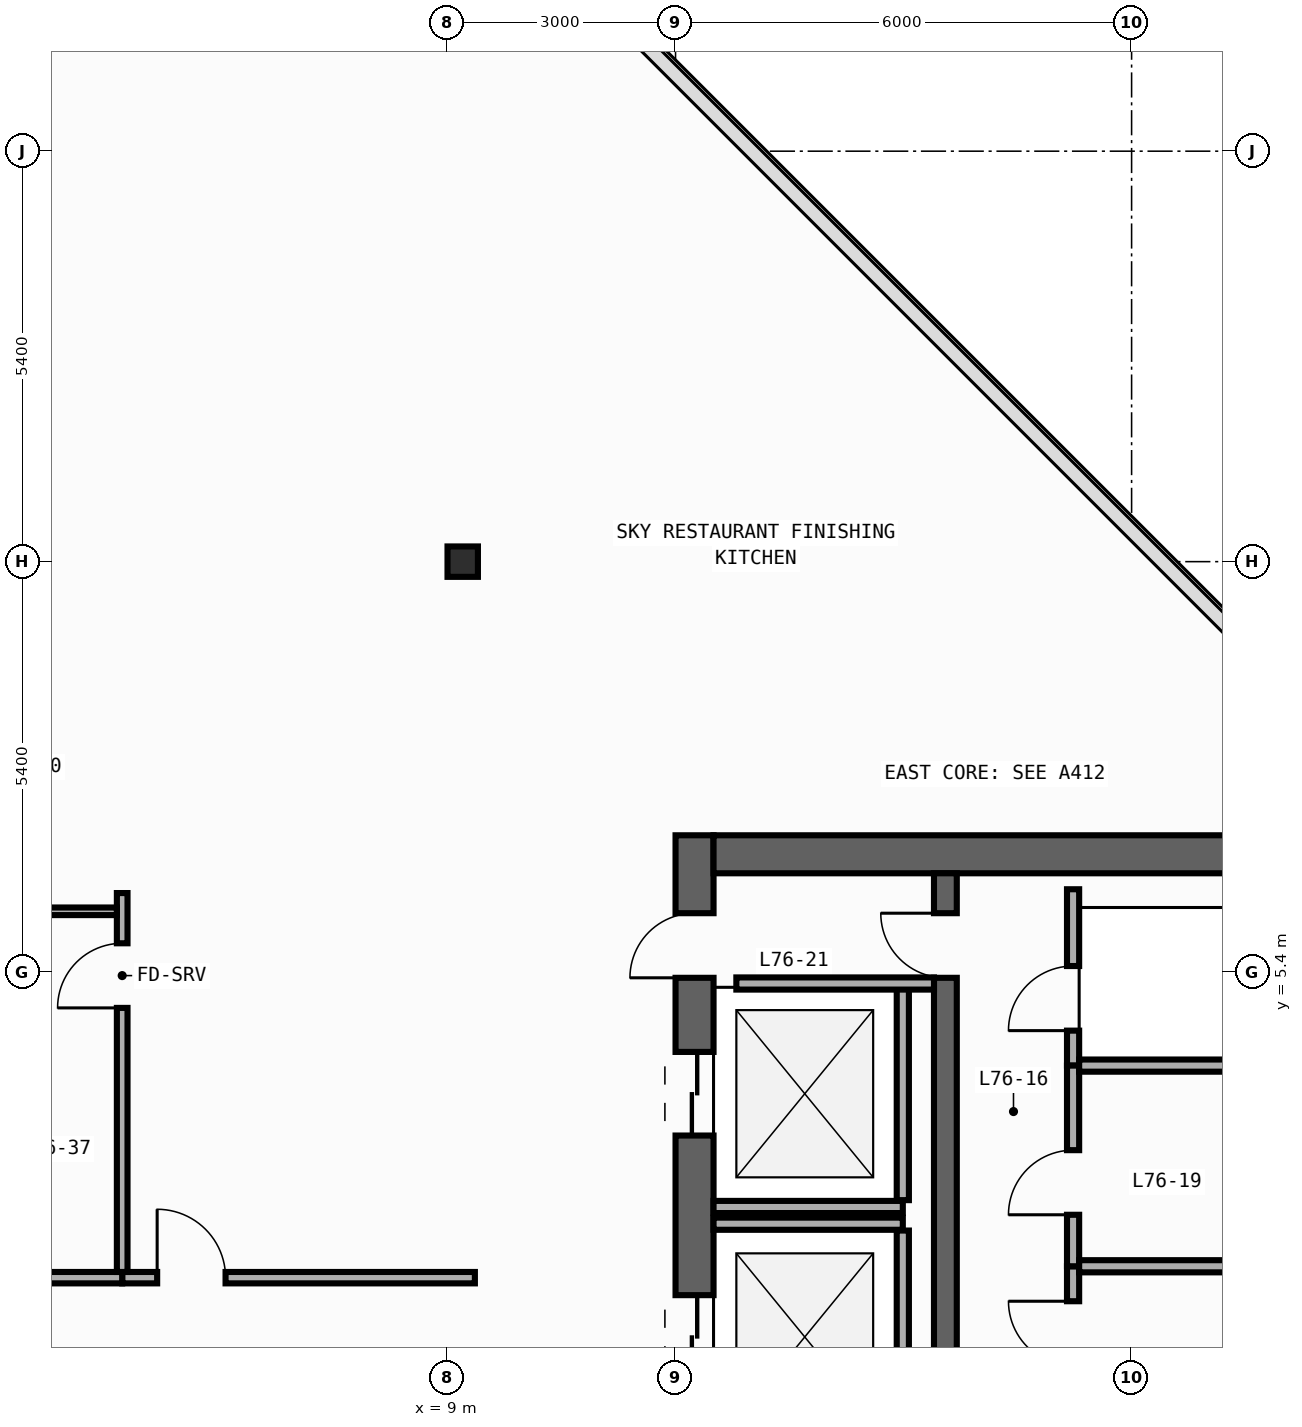
"""IFC4 building model, lengths in metres.
Left out: names, types, materials, properties, quantities, classifications, styles, units other than length and angle.
Written with IfcOpenShell. Run it as: python <this file> out.ifc"""

import sys

from ifc_helpers import new_model, si_unit, direction, frame, frame_2d, origin, origin_2d, place, context, subcontext, project, spatial, rectangle, i_section, extrude, element, fill, save


model = new_model("IFC4")
c1 = context("Model", 3, precision=1e-05, world=origin(), true_north=direction((0.0, 1.0)))
c2 = subcontext(c1, "Body", "Model", "MODEL_VIEW")
j1 = project(units=[si_unit("LENGTHUNIT", "METRE"), si_unit("PLANEANGLEUNIT", "RADIAN")], contexts=[c1])
p1 = place(None, origin())
s1 = spatial("IfcSite", under=j1, at=p1, CompositionType="ELEMENT")
p2 = place(p1, origin())
s2 = spatial("IfcBuilding", under=s1, at=p2, CompositionType="ELEMENT")
p3 = place(p2, frame((0.0, 0.0, 315.6)))
s3 = spatial("IfcBuildingStorey", under=s2, at=p3, CompositionType="ELEMENT", Elevation=315.6)
p4 = place(p3, frame((12.25, -19.8, 0.0), z_axis=(0.0, 0.0, 1.0), x_axis=(0.0, 1.0, 0.0)))
e1 = element("IfcWall", 1, at=p4, inside=s3, PredefinedType="SHEAR", context=c2, shape_type="SweptSolid", body=[
    extrude(rectangle(XDim=27.0, YDim=0.5, at=frame_2d((13.5, 0.0))), origin(), (0.0, 0.0, 1.0), 4.54),
])
p5 = place(p4, frame((23.05, 0.0, 0.0)))
e2 = element("IfcOpeningElement", 2, at=p5, cuts=e1, PredefinedType="OPENING", context=c2, shape_type="SweptSolid", body=[
    extrude(rectangle(XDim=1.1, YDim=2.2, at=frame_2d((0.55, 1.1))), frame((0.0, 0.26, 0.0), z_axis=(0.0, -1.0, 0.0), x_axis=(1.0, 0.0, 0.0)), (0.0, 0.0, 1.0), 0.52),
])
p6 = place(p4, frame((19.85, 0.0, 0.0)))
e3 = element("IfcOpeningElement", 3, at=p6, cuts=e1, PredefinedType="OPENING", context=c2, shape_type="SweptSolid", body=[
    extrude(rectangle(XDim=1.1, YDim=2.2, at=frame_2d((0.55, 1.1))), frame((0.0, 0.26, 0.0), z_axis=(0.0, -1.0, 0.0), x_axis=(1.0, 0.0, 0.0)), (0.0, 0.0, 1.0), 0.52),
])
p7 = place(p4, frame((16.65, 0.0, 0.0)))
e4 = element("IfcOpeningElement", 4, at=p7, cuts=e1, PredefinedType="OPENING", context=c2, shape_type="SweptSolid", body=[
    extrude(rectangle(XDim=1.1, YDim=2.2, at=frame_2d((0.55, 1.1))), frame((0.0, 0.26, 0.0), z_axis=(0.0, -1.0, 0.0), x_axis=(1.0, 0.0, 0.0)), (0.0, 0.0, 1.0), 0.52),
])
p8 = place(p4, frame((7.175, 0.0, 0.0)))
e5 = element("IfcOpeningElement", 5, at=p8, cuts=e1, PredefinedType="OPENING", context=c2, shape_type="SweptSolid", body=[
    extrude(rectangle(XDim=0.85, YDim=2.1, at=frame_2d((0.425, 1.05))), frame((0.0, 0.26, 0.0), z_axis=(0.0, -1.0, 0.0), x_axis=(1.0, 0.0, 0.0)), (0.0, 0.0, 1.0), 0.52),
])
p9 = place(p4, frame((10.375, 0.0, 0.0)))
e6 = element("IfcOpeningElement", 6, at=p9, cuts=e1, PredefinedType="OPENING", context=c2, shape_type="SweptSolid", body=[
    extrude(rectangle(XDim=0.85, YDim=2.1, at=frame_2d((0.425, 1.05))), frame((0.0, 0.26, 0.0), z_axis=(0.0, -1.0, 0.0), x_axis=(1.0, 0.0, 0.0)), (0.0, 0.0, 1.0), 0.52),
])
p10 = place(p4, frame((12.725, 0.0, 0.0)))
e7 = element("IfcOpeningElement", 7, at=p10, cuts=e1, PredefinedType="OPENING", context=c2, shape_type="SweptSolid", body=[
    extrude(rectangle(XDim=1.15, YDim=2.2, at=frame_2d((0.575, 1.1))), frame((0.0, 0.26, 0.0), z_axis=(0.0, -1.0, 0.0), x_axis=(1.0, 0.0, 0.0)), (0.0, 0.0, 1.0), 0.52),
])
p11 = place(p4, frame((25.125, 0.0, 0.0)))
e8 = element("IfcOpeningElement", 8, at=p11, cuts=e1, PredefinedType="OPENING", context=c2, shape_type="SweptSolid", body=[
    extrude(rectangle(XDim=0.85, YDim=2.1, at=frame_2d((0.425, 1.05))), frame((0.0, 0.26, 0.0), z_axis=(0.0, -1.0, 0.0), x_axis=(1.0, 0.0, 0.0)), (0.0, 0.0, 1.0), 0.52),
])
p12 = place(p3, frame((12.5, 6.95, 0.0), z_axis=(0.0, 0.0, 1.0), x_axis=(1.0, 0.0, 0.0)))
e9 = element("IfcWall", 9, at=p12, inside=s3, PredefinedType="SHEAR", context=c2, shape_type="SweptSolid", body=[
    extrude(rectangle(XDim=7.4, YDim=0.5, at=frame_2d((3.7, 0.0))), origin(), (0.0, 0.0, 1.0), 4.54),
])
p13 = place(p3, frame((15.55, -19.3, 0.0), z_axis=(0.0, 0.0, 1.0), x_axis=(0.0, 1.0, 0.0)))
e10 = element("IfcWall", 10, at=p13, inside=s3, PredefinedType="SHEAR", context=c2, shape_type="SweptSolid", body=[
    extrude(rectangle(XDim=26.0, YDim=0.3, at=frame_2d((13.0, 0.0))), origin(), (0.0, 0.0, 1.0), 4.54),
])
p14 = place(p13, frame((12.225, 0.0, 0.0)))
e11 = element("IfcOpeningElement", 11, at=p14, cuts=e10, PredefinedType="OPENING", context=c2, shape_type="SweptSolid", body=[
    extrude(rectangle(XDim=1.15, YDim=2.2, at=frame_2d((0.575, 1.1))), frame((0.0, 0.16, 0.0), z_axis=(0.0, -1.0, 0.0), x_axis=(1.0, 0.0, 0.0)), (0.0, 0.0, 1.0), 0.32),
])
p15 = place(p13, frame((24.625, 0.0, 0.0)))
e12 = element("IfcOpeningElement", 12, at=p15, cuts=e10, PredefinedType="OPENING", context=c2, shape_type="SweptSolid", body=[
    extrude(rectangle(XDim=0.85, YDim=2.1, at=frame_2d((0.425, 1.05))), frame((0.0, 0.16, 0.0), z_axis=(0.0, -1.0, 0.0), x_axis=(1.0, 0.0, 0.0)), (0.0, 0.0, 1.0), 0.32),
])
p16 = place(p3, frame((9.2, 10.8, 0.0), z_axis=(0.0, 0.0, 1.0), x_axis=(1.0, 0.0, 0.0)))
e13 = element("IfcColumn", 13, at=p16, inside=s3, PredefinedType="COLUMN", context=c2, shape_type="SweptSolid", body=[
    extrude(i_section(OverallWidth=0.4, OverallDepth=0.4, WebThickness=0.013, FlangeThickness=0.021, FilletRadius=0.022, at=origin_2d()), origin(), (0.0, 0.0, 1.0), 4.8),
])
p17 = place(p3, frame((12.5, 2.31, 0.0), z_axis=(0.0, 0.0, 1.0), x_axis=(1.0, 0.0, 0.0)))
e14 = element("IfcWall", 14, at=p17, inside=s3, PredefinedType="STANDARD", context=c2, shape_type="SweptSolid", body=[
    extrude(rectangle(XDim=2.49, YDim=0.16, at=frame_2d((1.245, 0.0))), origin(), (0.0, 0.0, 1.0), 4.54),
])
p18 = place(p3, frame((14.99, 2.4, 0.0), z_axis=(0.0, 0.0, 1.0), x_axis=(0.0, 1.0, 0.0)))
e15 = element("IfcWall", 15, at=p18, inside=s3, PredefinedType="STANDARD", context=c2, shape_type="SweptSolid", body=[
    extrude(rectangle(XDim=2.8, YDim=0.16, at=frame_2d((1.4, 0.0))), origin(), (0.0, 0.0, 1.0), 4.54),
])
p19 = place(p3, frame((12.5, 2.09, 0.0), z_axis=(0.0, 0.0, 1.0), x_axis=(1.0, 0.0, 0.0)))
e16 = element("IfcWall", 16, at=p19, inside=s3, PredefinedType="STANDARD", context=c2, shape_type="SweptSolid", body=[
    extrude(rectangle(XDim=2.49, YDim=0.16, at=frame_2d((1.245, 0.0))), origin(), (0.0, 0.0, 1.0), 4.54),
])
p20 = place(p3, frame((14.99, -0.8, 0.0), z_axis=(0.0, 0.0, 1.0), x_axis=(0.0, 1.0, 0.0)))
e17 = element("IfcWall", 17, at=p20, inside=s3, PredefinedType="STANDARD", context=c2, shape_type="SweptSolid", body=[
    extrude(rectangle(XDim=2.8, YDim=0.16, at=frame_2d((1.4, 0.0))), origin(), (0.0, 0.0, 1.0), 4.54),
])
p21 = place(p3, frame((12.8, 5.25, 0.0), z_axis=(0.0, 0.0, 1.0), x_axis=(1.0, 0.0, 0.0)))
e18 = element("IfcWall", 18, at=p21, inside=s3, PredefinedType="STANDARD", context=c2, shape_type="SweptSolid", body=[
    extrude(rectangle(XDim=2.6, YDim=0.16, at=frame_2d((1.3, 0.0))), origin(), (0.0, 0.0, 1.0), 4.54),
])
p22 = place(p3, frame((17.23, 4.17, 0.0), z_axis=(0.0, 0.0, 1.0), x_axis=(0.0, 1.0, 0.0)))
e19 = element("IfcWall", 19, at=p22, inside=s3, PredefinedType="PARTITIONING", context=c2, shape_type="SweptSolid", body=[
    extrude(rectangle(XDim=2.32, YDim=0.16, at=frame_2d((1.16, 0.0))), origin(), (0.0, 0.0, 1.0), 4.54),
])
p23 = place(p22, frame((0.46, 0.0, 0.0)))
e20 = element("IfcOpeningElement", 20, at=p23, cuts=e19, PredefinedType="OPENING", context=c2, shape_type="SweptSolid", body=[
    extrude(rectangle(XDim=0.85, YDim=2.1, at=frame_2d((0.425, 1.05))), frame((0.0, 0.09, 0.0), z_axis=(0.0, -1.0, 0.0), x_axis=(1.0, 0.0, 0.0)), (0.0, 0.0, 1.0), 0.18),
])
p24 = place(p3, frame((17.23, -1.14, 0.0), z_axis=(0.0, 0.0, 1.0), x_axis=(0.0, 1.0, 0.0)))
e21 = element("IfcWall", 21, at=p24, inside=s3, PredefinedType="PARTITIONING", context=c2, shape_type="SweptSolid", body=[
    extrude(rectangle(XDim=2.67, YDim=0.16, at=frame_2d((1.335, 0.0))), origin(), (0.0, 0.0, 1.0), 4.54),
])
p25 = place(p24, frame((1.36, 0.0, 0.0)))
e22 = element("IfcOpeningElement", 22, at=p25, cuts=e21, PredefinedType="OPENING", context=c2, shape_type="SweptSolid", body=[
    extrude(rectangle(XDim=0.85, YDim=2.1, at=frame_2d((0.425, 1.05))), frame((0.0, 0.09, 0.0), z_axis=(0.0, -1.0, 0.0), x_axis=(1.0, 0.0, 0.0)), (0.0, 0.0, 1.0), 0.18),
])
p26 = place(p3, frame((17.23, 1.53, 0.0), z_axis=(0.0, 0.0, 1.0), x_axis=(0.0, 1.0, 0.0)))
e23 = element("IfcWall", 23, at=p26, inside=s3, PredefinedType="PARTITIONING", context=c2, shape_type="SweptSolid", body=[
    extrude(rectangle(XDim=2.64, YDim=0.16, at=frame_2d((1.32, 0.0))), origin(), (0.0, 0.0, 1.0), 4.54),
])
p27 = place(p26, frame((0.677, 0.0, 0.0)))
e24 = element("IfcOpeningElement", 24, at=p27, cuts=e23, PredefinedType="OPENING", context=c2, shape_type="SweptSolid", body=[
    extrude(rectangle(XDim=0.85, YDim=2.1, at=frame_2d((0.425, 1.05))), frame((0.0, 0.09, 0.0), z_axis=(0.0, -1.0, 0.0), x_axis=(1.0, 0.0, 0.0)), (0.0, 0.0, 1.0), 0.18),
])
for number, where, z_axis, x_axis in (
    (25, (17.31, 4.17, 0.0), (0.0, 0.0, 1.0), (1.0, 0.0, 0.0)),
    (26, (17.31, 1.53, 0.0), (0.0, 0.0, 1.0), (1.0, 0.0, 0.0)),
):
    element("IfcWall", number, at=place(p3, frame(where, z_axis=z_axis, x_axis=x_axis)), inside=s3, PredefinedType="PARTITIONING", context=c2, shape_type="SweptSolid", body=[
        extrude(rectangle(XDim=2.59, YDim=0.16, at=frame_2d((1.295, 0.0))), origin(), (0.0, 0.0, 1.0), 4.54),
    ])
p28 = place(p3, frame((4.72, 1.38, 0.0), z_axis=(0.0, 0.0, 1.0), x_axis=(1.0, 0.0, 0.0)))
e27 = element("IfcWall", 27, at=p28, inside=s3, PredefinedType="PARTITIONING", context=c2, shape_type="SweptSolid", body=[
    extrude(rectangle(XDim=4.64, YDim=0.15, at=frame_2d((2.32, 0.0))), origin(), (0.0, 0.0, 1.0), 4.54),
])
p29 = place(p28, frame((0.46, 0.0, 0.0)))
e28 = element("IfcOpeningElement", 28, at=p29, cuts=e27, PredefinedType="OPENING", context=c2, shape_type="SweptSolid", body=[
    extrude(rectangle(XDim=0.9, YDim=2.15, at=frame_2d((0.45, 1.075))), frame((0.0, 0.085, 0.0), z_axis=(0.0, -1.0, 0.0), x_axis=(1.0, 0.0, 0.0)), (0.0, 0.0, 1.0), 0.17),
])
p30 = place(p3, frame((2.98, 1.38, 0.0), z_axis=(0.0, 0.0, 1.0), x_axis=(1.0, 0.0, 0.0)))
e29 = element("IfcWall", 29, at=p30, inside=s3, PredefinedType="PARTITIONING", context=c2, shape_type="SweptSolid", body=[
    extrude(rectangle(XDim=1.74, YDim=0.15, at=frame_2d((0.87, 0.0))), origin(), (0.0, 0.0, 1.0), 4.54),
])
p31 = place(p3, frame((4.72, 1.455, 0.0), z_axis=(0.0, 0.0, 1.0), x_axis=(0.0, 1.0, 0.0)))
e30 = element("IfcWall", 30, at=p31, inside=s3, PredefinedType="PARTITIONING", context=c2, shape_type="SweptSolid", body=[
    extrude(rectangle(XDim=4.985, YDim=0.14, at=frame_2d((2.492, 0.0))), origin(), (0.0, 0.0, 1.0), 4.19),
])
p32 = place(p31, frame((3.474, 0.0, 0.0)))
e31 = element("IfcOpeningElement", 31, at=p32, cuts=e30, PredefinedType="OPENING", context=c2, shape_type="SweptSolid", body=[
    extrude(rectangle(XDim=0.85, YDim=2.1, at=frame_2d((0.425, 1.05))), frame((0.0, 0.08, 0.0), z_axis=(0.0, -1.0, 0.0), x_axis=(1.0, 0.0, 0.0)), (0.0, 0.0, 1.0), 0.16),
])
p33 = place(p3, frame((3.05, 6.2, 0.0), z_axis=(0.0, 0.0, 1.0), x_axis=(1.0, 0.0, 0.0)))
e32 = element("IfcWall", 32, at=p33, inside=s3, PredefinedType="PARTITIONING", context=c2, shape_type="SweptSolid", body=[
    extrude(rectangle(XDim=1.6, YDim=0.1, at=frame_2d((0.8, 0.0))), origin(), (0.0, 0.0, 1.0), 4.54),
])
p34 = place(p5, origin())
e33 = element("IfcDoor", 33, at=p34, inside=s3, OperationType="DOUBLE_DOOR_SLIDING", PredefinedType="DOOR", context=c2, shape_type="SweptSolid", body=[
    extrude(rectangle(XDim=1.1, YDim=2.2, at=frame_2d((0.55, 1.1))), frame((0.0, 0.025, 0.0), z_axis=(0.0, -1.0, 0.0), x_axis=(1.0, 0.0, 0.0)), (0.0, 0.0, 1.0), 0.05),
])
fill(e2, e33)
p35 = place(p6, origin())
e34 = element("IfcDoor", 34, at=p35, inside=s3, OperationType="DOUBLE_DOOR_SLIDING", PredefinedType="DOOR", context=c2, shape_type="SweptSolid", body=[
    extrude(rectangle(XDim=1.1, YDim=2.2, at=frame_2d((0.55, 1.1))), frame((0.0, 0.025, 0.0), z_axis=(0.0, -1.0, 0.0), x_axis=(1.0, 0.0, 0.0)), (0.0, 0.0, 1.0), 0.05),
])
fill(e3, e34)
p36 = place(p11, origin())
e35 = element("IfcDoor", 35, at=p36, inside=s3, OperationType="SINGLE_SWING_LEFT", PredefinedType="DOOR", context=c2, shape_type="SweptSolid", body=[
    extrude(rectangle(XDim=0.85, YDim=2.1, at=frame_2d((0.425, 1.05))), frame((0.0, 0.025, 0.0), z_axis=(0.0, -1.0, 0.0), x_axis=(1.0, 0.0, 0.0)), (0.0, 0.0, 1.0), 0.05),
])
fill(e8, e35)
p37 = place(p15, origin())
e36 = element("IfcDoor", 36, at=p37, inside=s3, OperationType="SINGLE_SWING_RIGHT", PredefinedType="DOOR", context=c2, shape_type="SweptSolid", body=[
    extrude(rectangle(XDim=0.85, YDim=2.1, at=frame_2d((0.425, 1.05))), frame((0.0, 0.025, 0.0), z_axis=(0.0, -1.0, 0.0), x_axis=(1.0, 0.0, 0.0)), (0.0, 0.0, 1.0), 0.05),
])
fill(e12, e36)
p38 = place(p23, origin())
e37 = element("IfcDoor", 37, at=p38, inside=s3, OperationType="SINGLE_SWING_LEFT", PredefinedType="DOOR", context=c2, shape_type="SweptSolid", body=[
    extrude(rectangle(XDim=0.85, YDim=2.1, at=frame_2d((0.425, 1.05))), frame((0.0, 0.025, 0.0), z_axis=(0.0, -1.0, 0.0), x_axis=(1.0, 0.0, 0.0)), (0.0, 0.0, 1.0), 0.05),
])
fill(e20, e37)
p39 = place(p25, origin())
e38 = element("IfcDoor", 38, at=p39, inside=s3, OperationType="SINGLE_SWING_RIGHT", PredefinedType="DOOR", context=c2, shape_type="SweptSolid", body=[
    extrude(rectangle(XDim=0.85, YDim=2.1, at=frame_2d((0.425, 1.05))), frame((0.0, 0.025, 0.0), z_axis=(0.0, -1.0, 0.0), x_axis=(1.0, 0.0, 0.0)), (0.0, 0.0, 1.0), 0.05),
])
fill(e22, e38)
p40 = place(p27, origin())
e39 = element("IfcDoor", 39, at=p40, inside=s3, OperationType="SINGLE_SWING_LEFT", PredefinedType="DOOR", context=c2, shape_type="SweptSolid", body=[
    extrude(rectangle(XDim=0.85, YDim=2.1, at=frame_2d((0.425, 1.05))), frame((0.0, 0.025, 0.0), z_axis=(0.0, -1.0, 0.0), x_axis=(1.0, 0.0, 0.0)), (0.0, 0.0, 1.0), 0.05),
])
fill(e24, e39)
p41 = place(p29, origin())
e40 = element("IfcDoor", 40, at=p41, inside=s3, OperationType="SINGLE_SWING_LEFT", PredefinedType="DOOR", context=c2, shape_type="SweptSolid", body=[
    extrude(rectangle(XDim=0.9, YDim=2.15, at=frame_2d((0.45, 1.075))), frame((0.0, 0.025, 0.0), z_axis=(0.0, -1.0, 0.0), x_axis=(1.0, 0.0, 0.0)), (0.0, 0.0, 1.0), 0.05),
])
fill(e28, e40)
p42 = place(p32, origin())
e41 = element("IfcDoor", 41, at=p42, inside=s3, OperationType="SINGLE_SWING_LEFT", PredefinedType="DOOR", context=c2, shape_type="SweptSolid", body=[
    extrude(rectangle(XDim=0.85, YDim=2.1, at=frame_2d((0.425, 1.05))), frame((0.0, 0.025, 0.0), z_axis=(0.0, -1.0, 0.0), x_axis=(1.0, 0.0, 0.0)), (0.0, 0.0, 1.0), 0.05),
])
fill(e31, e41)
save(model, sys.argv[1])
